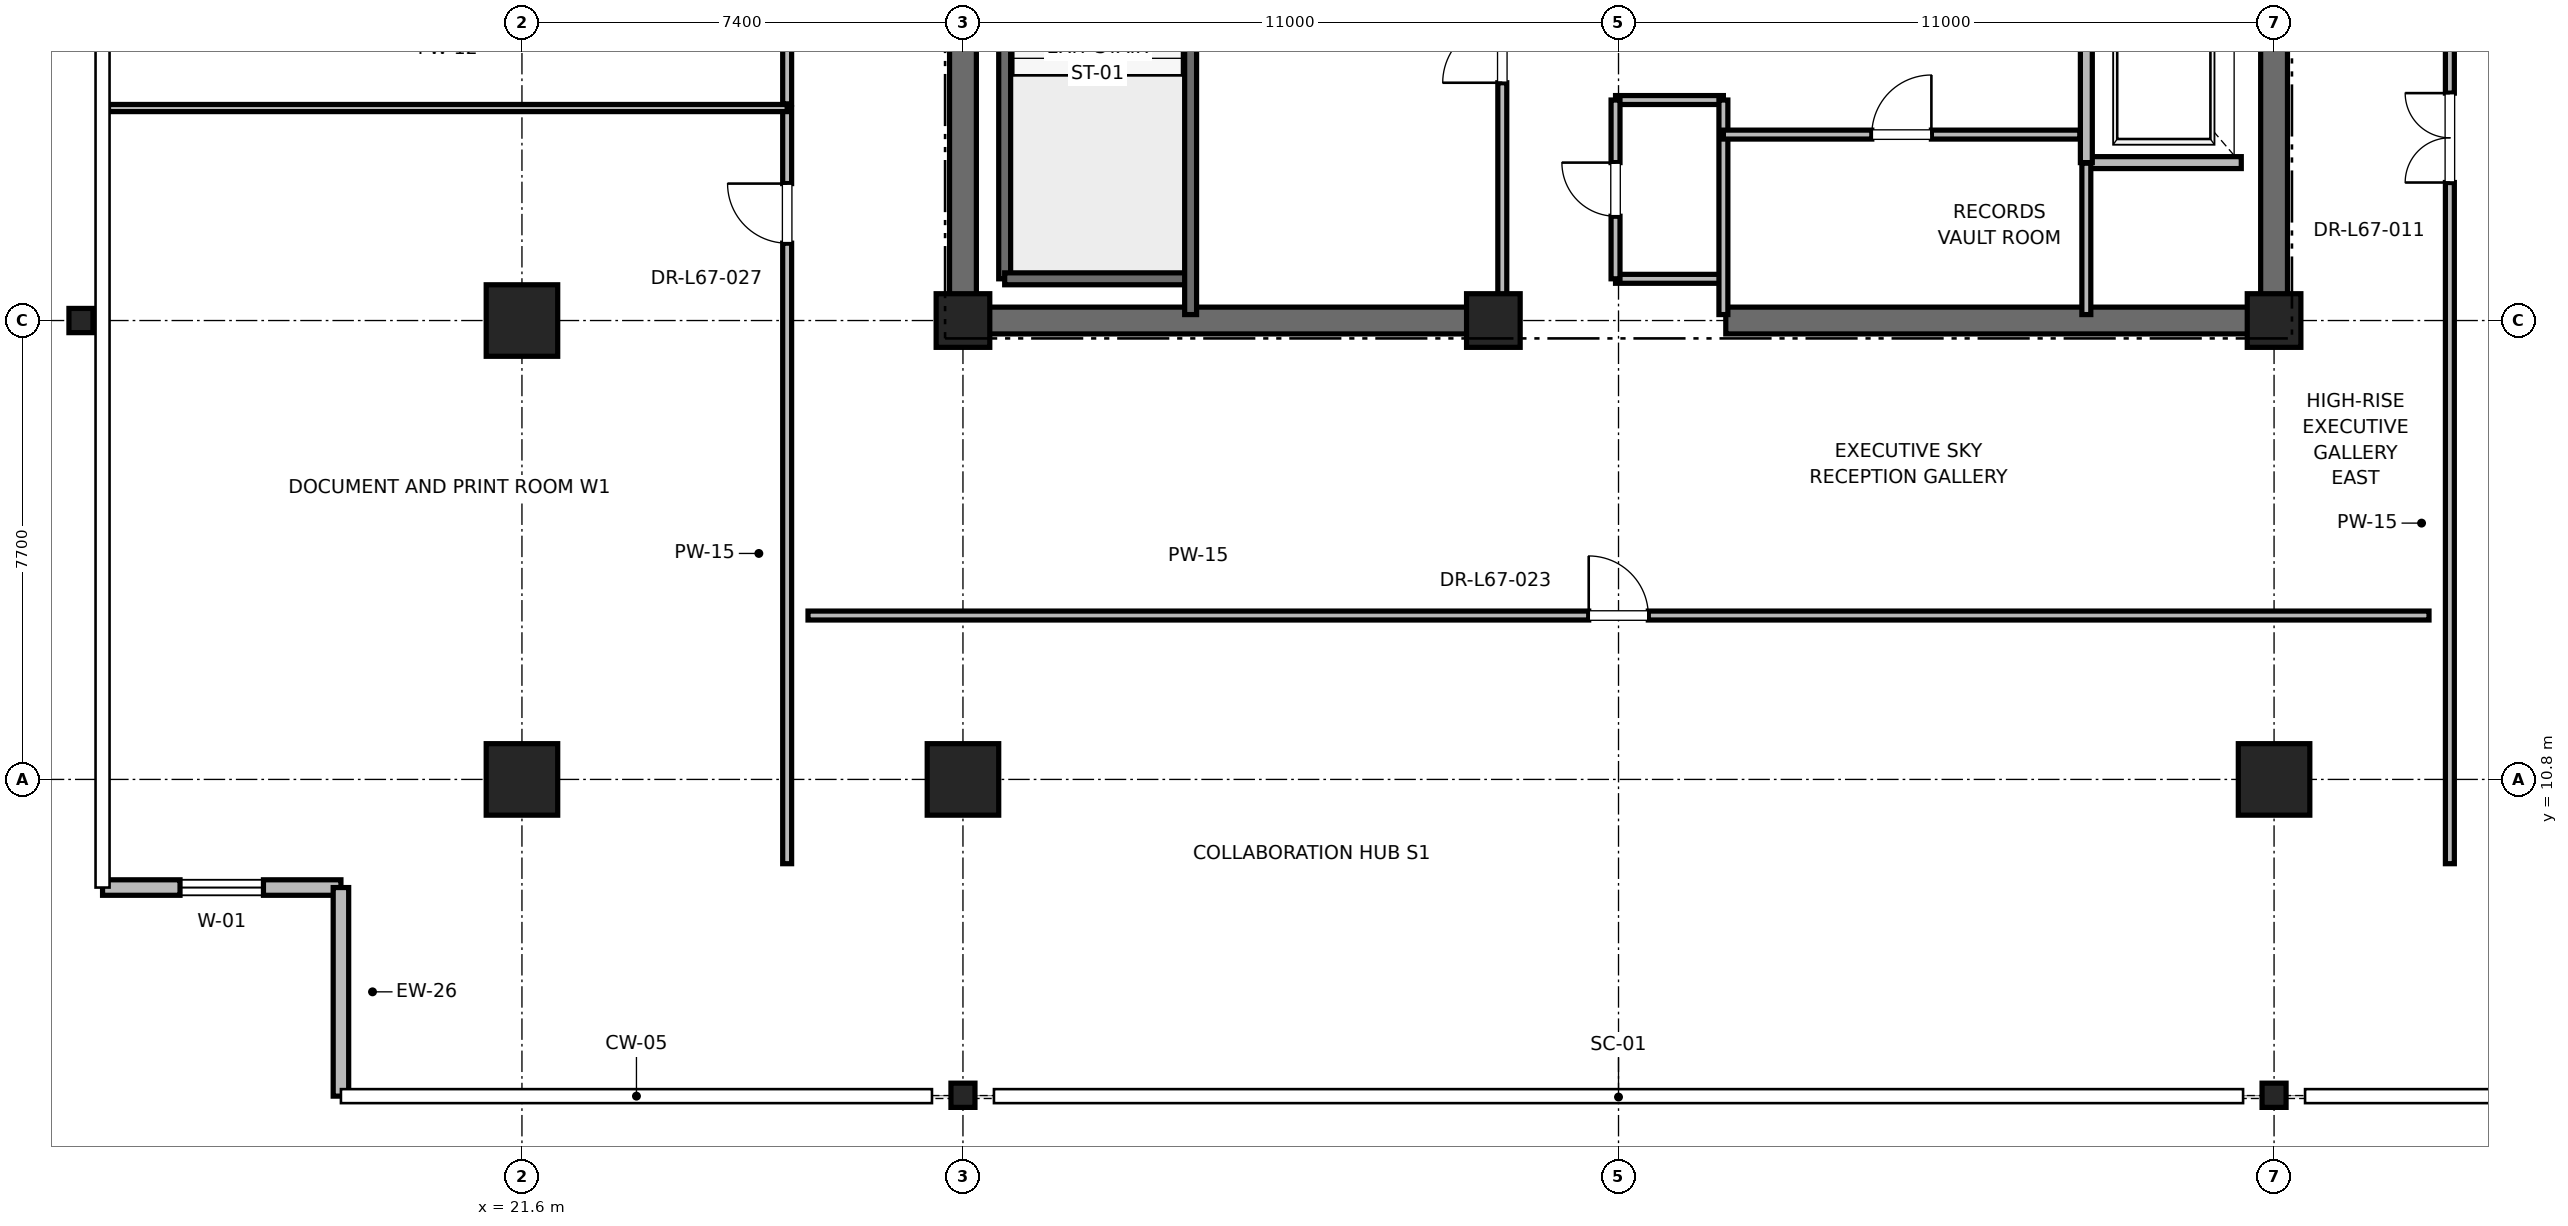
"""IFC4 building model, lengths in metres.
Left out: names, types, materials, properties, quantities, classifications, styles, units other than length and angle.
Written with IfcOpenShell. Run it as: python <this file> out.ifc"""

import sys

from ifc_helpers import new_model, si_unit, direction, frame, frame_2d, origin, origin_2d, place, context, subcontext, project, spatial, rectangle, i_section, extrude, element, fill, save


model = new_model("IFC4")
c1 = context("Model", 3, precision=1e-05, world=origin(), true_north=direction((0.0, 1.0)))
c2 = subcontext(c1, "Body", "Model", "MODEL_VIEW")
j1 = project(units=[si_unit("LENGTHUNIT", "METRE"), si_unit("PLANEANGLEUNIT", "RADIAN")], contexts=[c1])
p1 = place(None, origin())
s1 = spatial("IfcSite", under=j1, at=p1, CompositionType="ELEMENT")
p2 = place(p1, origin())
s2 = spatial("IfcBuilding", under=s1, at=p2, CompositionType="ELEMENT")
p3 = place(p2, frame((0.0, 0.0, 287.2)))
s3 = spatial("IfcBuildingStorey", under=s2, at=p3, CompositionType="ELEMENT", Elevation=287.2)
for number, where, z_axis, x_axis in (
    (1, (29.0, 10.8, 0.0), (0.0, 0.0, 1.0), (1.0, 0.0, 0.0)),
    (2, (51.0, 10.8, 0.0), (0.0, 0.0, 1.0), (1.0, 0.0, 0.0)),
    (3, (21.6, 18.5, 0.0), (0.0, 0.0, 1.0), (1.0, 0.0, 0.0)),
    (4, (21.6, 10.8, 0.0), (0.0, 0.0, 1.0), (1.0, 0.0, 0.0)),
):
    element("IfcColumn", number, at=place(p3, frame(where, z_axis=z_axis, x_axis=x_axis)), inside=s3, PredefinedType="COLUMN", context=c2, shape_type="SweptSolid", body=[
        extrude(rectangle(XDim=1.2, YDim=1.2, at=origin_2d()), origin(), (0.0, 0.0, 1.0), 4.0),
    ])
for number, where, z_axis, x_axis in (
    (5, (14.2, 18.5, 0.0), (0.0, 0.0, 1.0), (1.0, 0.0, 0.0)),
    (6, (29.0, 5.5, 0.0), (0.0, 0.0, 1.0), (1.0, 0.0, 0.0)),
    (7, (51.0, 5.5, 0.0), (0.0, 0.0, 1.0), (1.0, 0.0, 0.0)),
):
    element("IfcColumn", number, at=place(p3, frame(where, z_axis=z_axis, x_axis=x_axis)), inside=s3, PredefinedType="COLUMN", context=c2, shape_type="SweptSolid", body=[
        extrude(i_section(OverallWidth=0.403, OverallDepth=0.406, WebThickness=0.027, FlangeThickness=0.043, FilletRadius=0.015, at=origin_2d()), origin(), (0.0, 0.0, 1.0), 4.0),
    ])
for number, where, z_axis, x_axis in (
    (8, (29.0, 18.5, 0.0), (0.0, 0.0, 1.0), (1.0, 0.0, 0.0)),
    (9, (51.0, 18.5, 0.0), (0.0, 0.0, 1.0), (1.0, 0.0, 0.0)),
    (10, (37.9, 18.5, 0.0), (0.0, 0.0, 1.0), (1.0, 0.0, 0.0)),
):
    element("IfcColumn", number, at=place(p3, frame(where, z_axis=z_axis, x_axis=x_axis)), inside=s3, PredefinedType="PILASTER", context=c2, shape_type="SweptSolid", body=[
        extrude(rectangle(XDim=0.9, YDim=0.9, at=origin_2d()), origin(), (0.0, 0.0, 1.0), 4.0),
    ])
for number, where, z_axis, x_axis in (
    (11, (29.0, 18.5, 0.0), (0.0, 0.0, 1.0), (1.0, 0.0, 0.0)),
    (12, (41.8, 18.5, 0.0), (0.0, 0.0, 1.0), (1.0, 0.0, 0.0)),
):
    element("IfcWall", number, at=place(p3, frame(where, z_axis=z_axis, x_axis=x_axis)), inside=s3, PredefinedType="SHEAR", context=c2, shape_type="SweptSolid", body=[
        extrude(rectangle(XDim=9.2, YDim=0.45, at=frame_2d((4.6, 0.0))), origin(), (0.0, 0.0, 1.0), 3.785),
    ])
p4 = place(p3, frame((29.0, 18.5, 0.0), z_axis=(0.0, 0.0, 1.0), x_axis=(0.0, 1.0, 0.0)))
e13 = element("IfcWall", 13, at=p4, inside=s3, PredefinedType="SHEAR", context=c2, shape_type="SweptSolid", body=[
    extrude(rectangle(XDim=8.8, YDim=0.45, at=frame_2d((4.4, 0.0))), origin(), (0.0, 0.0, 1.0), 3.785),
])
p5 = place(p3, frame((51.0, 18.5, 0.0), z_axis=(0.0, 0.0, 1.0), x_axis=(0.0, 1.0, 0.0)))
e14 = element("IfcWall", 14, at=p5, inside=s3, PredefinedType="SHEAR", context=c2, shape_type="SweptSolid", body=[
    extrude(rectangle(XDim=5.8, YDim=0.45, at=frame_2d((2.9, 0.0))), origin(), (0.0, 0.0, 1.0), 3.785),
])
p6 = place(p3, frame((14.562, 8.986, 0.0), z_axis=(0.0, 0.0, 1.0), x_axis=(1.0, 0.0, 0.0)))
e15 = element("IfcWall", 15, at=p6, inside=s3, PredefinedType="PARAPET", context=c2, shape_type="SweptSolid", body=[
    extrude(rectangle(XDim=4.0, YDim=0.26, at=frame_2d((2.0, 0.0))), origin(), (0.0, 0.0, 1.0), 3.785),
])
p7 = place(p6, frame((1.3, 0.0, 0.85)))
e16 = element("IfcOpeningElement", 16, at=p7, cuts=e15, PredefinedType="OPENING", context=c2, shape_type="SweptSolid", body=[
    extrude(rectangle(XDim=1.4, YDim=2.0, at=frame_2d((0.7, 1.0))), frame((0.0, 0.13, 0.0), z_axis=(0.0, -1.0, 0.0), x_axis=(1.0, 0.0, 0.0)), (0.0, 0.0, 1.0), 0.26),
])
p8 = place(p3, frame((18.562, 8.986, 0.0), z_axis=(0.0, 0.0, 1.0), x_axis=(0.0, -1.0, 0.0)))
e17 = element("IfcWall", 17, at=p8, inside=s3, PredefinedType="PARAPET", context=c2, shape_type="SweptSolid", body=[
    extrude(rectangle(XDim=3.5, YDim=0.26, at=frame_2d((1.75, 0.0))), origin(), (0.0, 0.0, 1.0), 3.785),
])
p9 = place(p3, frame((29.7, 19.2, 0.0), z_axis=(0.0, 0.0, 1.0), x_axis=(0.0, 1.0, 0.0)))
e18 = element("IfcWall", 18, at=p9, inside=s3, PredefinedType="SOLIDWALL", context=c2, shape_type="SweptSolid", body=[
    extrude(rectangle(XDim=8.15, YDim=0.2, at=frame_2d((4.075, 0.0))), origin(), (0.0, 0.0, 1.0), 3.785),
])
p10 = place(p3, frame((29.7, 19.2, 0.0), z_axis=(0.0, 0.0, 1.0), x_axis=(1.0, 0.0, 0.0)))
e19 = element("IfcWall", 19, at=p10, inside=s3, PredefinedType="SOLIDWALL", context=c2, shape_type="SweptSolid", body=[
    extrude(rectangle(XDim=3.12, YDim=0.2, at=frame_2d((1.56, 0.0))), origin(), (0.0, 0.0, 1.0), 3.785),
])
p11 = place(p3, frame((32.82, 18.6, 0.0), z_axis=(0.0, 0.0, 1.0), x_axis=(0.0, 1.0, 0.0)))
e20 = element("IfcWall", 20, at=p11, inside=s3, PredefinedType="SOLIDWALL", context=c2, shape_type="SweptSolid", body=[
    extrude(rectangle(XDim=8.78, YDim=0.2, at=frame_2d((4.39, 0.0))), origin(), (0.0, 0.0, 1.0), 3.785),
])
p12 = place(p3, frame((47.85, 21.15, 0.0), z_axis=(0.0, 0.0, 1.0), x_axis=(1.0, 0.0, 0.0)))
e21 = element("IfcWall", 21, at=p12, inside=s3, PredefinedType="SOLIDWALL", context=c2, shape_type="SweptSolid", body=[
    extrude(rectangle(XDim=2.6, YDim=0.2, at=frame_2d((1.3, 0.0))), origin(), (0.0, 0.0, 1.0), 3.785),
])
p13 = place(p3, frame((47.85, 24.15, 0.0), z_axis=(0.0, 0.0, 1.0), x_axis=(0.0, -1.0, 0.0)))
e22 = element("IfcWall", 22, at=p13, inside=s3, PredefinedType="SOLIDWALL", context=c2, shape_type="SweptSolid", body=[
    extrude(rectangle(XDim=3.0, YDim=0.2, at=frame_2d((1.5, 0.0))), origin(), (0.0, 0.0, 1.0), 3.785),
])
for number, where, z_axis, x_axis in (
    (23, (39.95, 19.2, 0.0), (0.0, 0.0, 1.0), (1.0, 0.0, 0.0)),
    (24, (39.95, 22.2, 0.0), (0.0, 0.0, 1.0), (1.0, 0.0, 0.0)),
):
    element("IfcWall", number, at=place(p3, frame(where, z_axis=z_axis, x_axis=x_axis)), inside=s3, PredefinedType="PARTITIONING", context=c2, shape_type="SweptSolid", body=[
        extrude(rectangle(XDim=1.81, YDim=0.15, at=frame_2d((0.905, 0.0))), origin(), (0.0, 0.0, 1.0), 2.85),
    ])
p14 = place(p3, frame((41.76, 18.6, 0.0), z_axis=(0.0, 0.0, 1.0), x_axis=(0.0, 1.0, 0.0)))
e25 = element("IfcWall", 25, at=p14, inside=s3, PredefinedType="PARTITIONING", context=c2, shape_type="SweptSolid", body=[
    extrude(rectangle(XDim=3.6, YDim=0.15, at=frame_2d((1.8, 0.0))), origin(), (0.0, 0.0, 1.0), 2.85),
])
p15 = place(p3, frame((39.95, 19.2, 0.0), z_axis=(0.0, 0.0, 1.0), x_axis=(0.0, 1.0, 0.0)))
e26 = element("IfcWall", 26, at=p15, inside=s3, PredefinedType="PARTITIONING", context=c2, shape_type="SweptSolid", body=[
    extrude(rectangle(XDim=3.0, YDim=0.15, at=frame_2d((1.5, 0.0))), origin(), (0.0, 0.0, 1.0), 2.85),
])
p16 = place(p15, frame((1.05, 0.0, 0.0)))
e27 = element("IfcOpeningElement", 27, at=p16, cuts=e26, PredefinedType="OPENING", context=c2, shape_type="SweptSolid", body=[
    extrude(rectangle(XDim=0.9, YDim=2.1, at=frame_2d((0.45, 1.05))), frame((0.0, 0.075, 0.0), z_axis=(0.0, -1.0, 0.0), x_axis=(1.0, 0.0, 0.0)), (0.0, 0.0, 1.0), 0.15),
])
p17 = place(p3, frame((38.05, 18.6, 0.0), z_axis=(0.0, 0.0, 1.0), x_axis=(0.0, 1.0, 0.0)))
e28 = element("IfcWall", 28, at=p17, inside=s3, PredefinedType="PARTITIONING", context=c2, shape_type="SweptSolid", body=[
    extrude(rectangle(XDim=8.78, YDim=0.15, at=frame_2d((4.39, 0.0))), origin(), (0.0, 0.0, 1.0), 2.85),
])
p18 = place(p17, frame((3.89, 0.0, 0.0)))
e29 = element("IfcOpeningElement", 29, at=p18, cuts=e28, PredefinedType="OPENING", context=c2, shape_type="SweptSolid", body=[
    extrude(rectangle(XDim=1.0, YDim=2.15, at=frame_2d((0.5, 1.075))), frame((0.0, 0.075, 0.0), z_axis=(0.0, -1.0, 0.0), x_axis=(1.0, 0.0, 0.0)), (0.0, 0.0, 1.0), 0.15),
])
p19 = place(p3, frame((47.85, 18.6, 0.0), z_axis=(0.0, 0.0, 1.0), x_axis=(0.0, 1.0, 0.0)))
e30 = element("IfcWall", 30, at=p19, inside=s3, PredefinedType="PARTITIONING", context=c2, shape_type="SweptSolid", body=[
    extrude(rectangle(XDim=2.54, YDim=0.15, at=frame_2d((1.27, 0.0))), origin(), (0.0, 0.0, 1.0), 2.85),
])
p20 = place(p3, frame((41.76, 21.62, 0.0), z_axis=(0.0, 0.0, 1.0), x_axis=(1.0, 0.0, 0.0)))
e31 = element("IfcWall", 31, at=p20, inside=s3, PredefinedType="PARTITIONING", context=c2, shape_type="SweptSolid", body=[
    extrude(rectangle(XDim=5.98, YDim=0.15, at=frame_2d((2.99, 0.0))), origin(), (0.0, 0.0, 1.0), 2.85),
])
p21 = place(p20, frame((2.49, 0.0, 0.0)))
e32 = element("IfcOpeningElement", 32, at=p21, cuts=e31, PredefinedType="OPENING", context=c2, shape_type="SweptSolid", body=[
    extrude(rectangle(XDim=1.0, YDim=2.15, at=frame_2d((0.5, 1.075))), frame((0.0, 0.075, 0.0), z_axis=(0.0, -1.0, 0.0), x_axis=(1.0, 0.0, 0.0)), (0.0, 0.0, 1.0), 0.15),
])
p22 = place(p3, frame((26.4, 13.55, 0.0), z_axis=(0.0, 0.0, 1.0), x_axis=(1.0, 0.0, 0.0)))
e33 = element("IfcWall", 33, at=p22, inside=s3, PredefinedType="PARTITIONING", context=c2, shape_type="SweptSolid", body=[
    extrude(rectangle(XDim=27.2, YDim=0.15, at=frame_2d((13.6, 0.0))), origin(), (0.0, 0.0, 1.0), 2.85),
])
p23 = place(p22, frame((13.1, 0.0, 0.0)))
e34 = element("IfcOpeningElement", 34, at=p23, cuts=e33, PredefinedType="OPENING", context=c2, shape_type="SweptSolid", body=[
    extrude(rectangle(XDim=1.0, YDim=2.15, at=frame_2d((0.5, 1.075))), frame((0.0, 0.075, 0.0), z_axis=(0.0, -1.0, 0.0), x_axis=(1.0, 0.0, 0.0)), (0.0, 0.0, 1.0), 0.15),
])
p24 = place(p3, frame((26.05, 9.386, 0.0), z_axis=(0.0, 0.0, 1.0), x_axis=(0.0, 1.0, 0.0)))
e35 = element("IfcWall", 35, at=p24, inside=s3, PredefinedType="PARTITIONING", context=c2, shape_type="SweptSolid", body=[
    extrude(rectangle(XDim=12.68, YDim=0.15, at=frame_2d((6.34, 0.0))), origin(), (0.0, 0.0, 1.0), 2.85),
])
p25 = place(p24, frame((10.412, 0.0, 0.0)))
e36 = element("IfcOpeningElement", 36, at=p25, cuts=e35, PredefinedType="OPENING", context=c2, shape_type="SweptSolid", body=[
    extrude(rectangle(XDim=1.0, YDim=2.15, at=frame_2d((0.5, 1.075))), frame((0.0, 0.075, 0.0), z_axis=(0.0, -1.0, 0.0), x_axis=(1.0, 0.0, 0.0)), (0.0, 0.0, 1.0), 0.15),
])
p26 = place(p3, frame((14.663, 22.066, 0.0), z_axis=(0.0, 0.0, 1.0), x_axis=(1.0, 0.0, 0.0)))
e37 = element("IfcWall", 37, at=p26, inside=s3, PredefinedType="PARTITIONING", context=c2, shape_type="SweptSolid", body=[
    extrude(rectangle(XDim=11.387, YDim=0.12, at=frame_2d((5.694, 0.0))), origin(), (0.0, 0.0, 1.0), 2.85),
])
p27 = place(p3, frame((26.05, 22.136, 0.0), z_axis=(0.0, 0.0, 1.0), x_axis=(0.0, 1.0, 0.0)))
e38 = element("IfcWall", 38, at=p27, inside=s3, PredefinedType="PARTITIONING", context=c2, shape_type="SweptSolid", body=[
    extrude(rectangle(XDim=12.248, YDim=0.15, at=frame_2d((6.124, 0.0))), origin(), (0.0, 0.0, 1.0), 2.85),
])
p28 = place(p27, frame((5.589, 0.0, 0.0)))
e39 = element("IfcOpeningElement", 39, at=p28, cuts=e38, PredefinedType="OPENING", context=c2, shape_type="SweptSolid", body=[
    extrude(rectangle(XDim=1.0, YDim=2.15, at=frame_2d((0.5, 1.075))), frame((0.0, 0.075, 0.0), z_axis=(0.0, -1.0, 0.0), x_axis=(1.0, 0.0, 0.0)), (0.0, 0.0, 1.0), 0.15),
])
p29 = place(p3, frame((53.95, 9.386, 0.0), z_axis=(0.0, 0.0, 1.0), x_axis=(0.0, 1.0, 0.0)))
e40 = element("IfcWall", 40, at=p29, inside=s3, PredefinedType="PARTITIONING", context=c2, shape_type="SweptSolid", body=[
    extrude(rectangle(XDim=15.216, YDim=0.15, at=frame_2d((7.608, 0.0))), origin(), (0.0, 0.0, 1.0), 2.85),
])
p30 = place(p29, frame((11.43, 0.0, 0.0)))
e41 = element("IfcOpeningElement", 41, at=p30, cuts=e40, PredefinedType="OPENING", context=c2, shape_type="SweptSolid", body=[
    extrude(rectangle(XDim=1.5, YDim=2.25, at=frame_2d((0.75, 1.125))), frame((0.0, 0.075, 0.0), z_axis=(0.0, -1.0, 0.0), x_axis=(1.0, 0.0, 0.0)), (0.0, 0.0, 1.0), 0.15),
])
p31 = place(p7, origin())
e42 = element("IfcWindow", 42, at=p31, inside=s3, PartitioningType="SINGLE_PANEL", PredefinedType="WINDOW", context=c2, shape_type="SweptSolid", body=[
    extrude(rectangle(XDim=1.4, YDim=2.0, at=frame_2d((0.7, 1.0))), frame((0.0, 0.03, 0.0), z_axis=(0.0, -1.0, 0.0), x_axis=(1.0, 0.0, 0.0)), (0.0, 0.0, 1.0), 0.06),
])
fill(e16, e42)
p32 = place(p16, origin())
e43 = element("IfcDoor", 43, at=p32, inside=s3, OperationType="SINGLE_SWING_RIGHT", PredefinedType="DOOR", context=c2, shape_type="SweptSolid", body=[
    extrude(rectangle(XDim=0.9, YDim=2.1, at=frame_2d((0.45, 1.05))), frame((0.0, 0.025, 0.0), z_axis=(0.0, -1.0, 0.0), x_axis=(1.0, 0.0, 0.0)), (0.0, 0.0, 1.0), 0.05),
])
fill(e27, e43)
p33 = place(p18, origin())
e44 = element("IfcDoor", 44, at=p33, inside=s3, OperationType="SINGLE_SWING_LEFT", PredefinedType="DOOR", context=c2, shape_type="SweptSolid", body=[
    extrude(rectangle(XDim=1.0, YDim=2.15, at=frame_2d((0.5, 1.075))), frame((0.0, 0.025, 0.0), z_axis=(0.0, -1.0, 0.0), x_axis=(1.0, 0.0, 0.0)), (0.0, 0.0, 1.0), 0.05),
])
fill(e29, e44)
p34 = place(p21, origin())
e45 = element("IfcDoor", 45, at=p34, inside=s3, OperationType="SINGLE_SWING_RIGHT", PredefinedType="DOOR", context=c2, shape_type="SweptSolid", body=[
    extrude(rectangle(XDim=1.0, YDim=2.15, at=frame_2d((0.5, 1.075))), frame((0.0, 0.025, 0.0), z_axis=(0.0, -1.0, 0.0), x_axis=(1.0, 0.0, 0.0)), (0.0, 0.0, 1.0), 0.05),
])
fill(e32, e45)
p35 = place(p23, origin())
e46 = element("IfcDoor", 46, at=p35, inside=s3, OperationType="SINGLE_SWING_LEFT", PredefinedType="DOOR", context=c2, shape_type="SweptSolid", body=[
    extrude(rectangle(XDim=1.0, YDim=2.15, at=frame_2d((0.5, 1.075))), frame((0.0, 0.025, 0.0), z_axis=(0.0, -1.0, 0.0), x_axis=(1.0, 0.0, 0.0)), (0.0, 0.0, 1.0), 0.05),
])
fill(e34, e46)
p36 = place(p25, origin())
e47 = element("IfcDoor", 47, at=p36, inside=s3, OperationType="SINGLE_SWING_RIGHT", PredefinedType="DOOR", context=c2, shape_type="SweptSolid", body=[
    extrude(rectangle(XDim=1.0, YDim=2.15, at=frame_2d((0.5, 1.075))), frame((0.0, 0.025, 0.0), z_axis=(0.0, -1.0, 0.0), x_axis=(1.0, 0.0, 0.0)), (0.0, 0.0, 1.0), 0.05),
])
fill(e36, e47)
p37 = place(p30, origin())
e48 = element("IfcDoor", 48, at=p37, inside=s3, OperationType="DOUBLE_DOOR_SINGLE_SWING", PredefinedType="DOOR", context=c2, shape_type="SweptSolid", body=[
    extrude(rectangle(XDim=1.5, YDim=2.25, at=frame_2d((0.75, 1.125))), frame((0.0, 0.025, 0.0), z_axis=(0.0, -1.0, 0.0), x_axis=(1.0, 0.0, 0.0)), (0.0, 0.0, 1.0), 0.05),
])
fill(e41, e48)
save(model, sys.argv[1])
